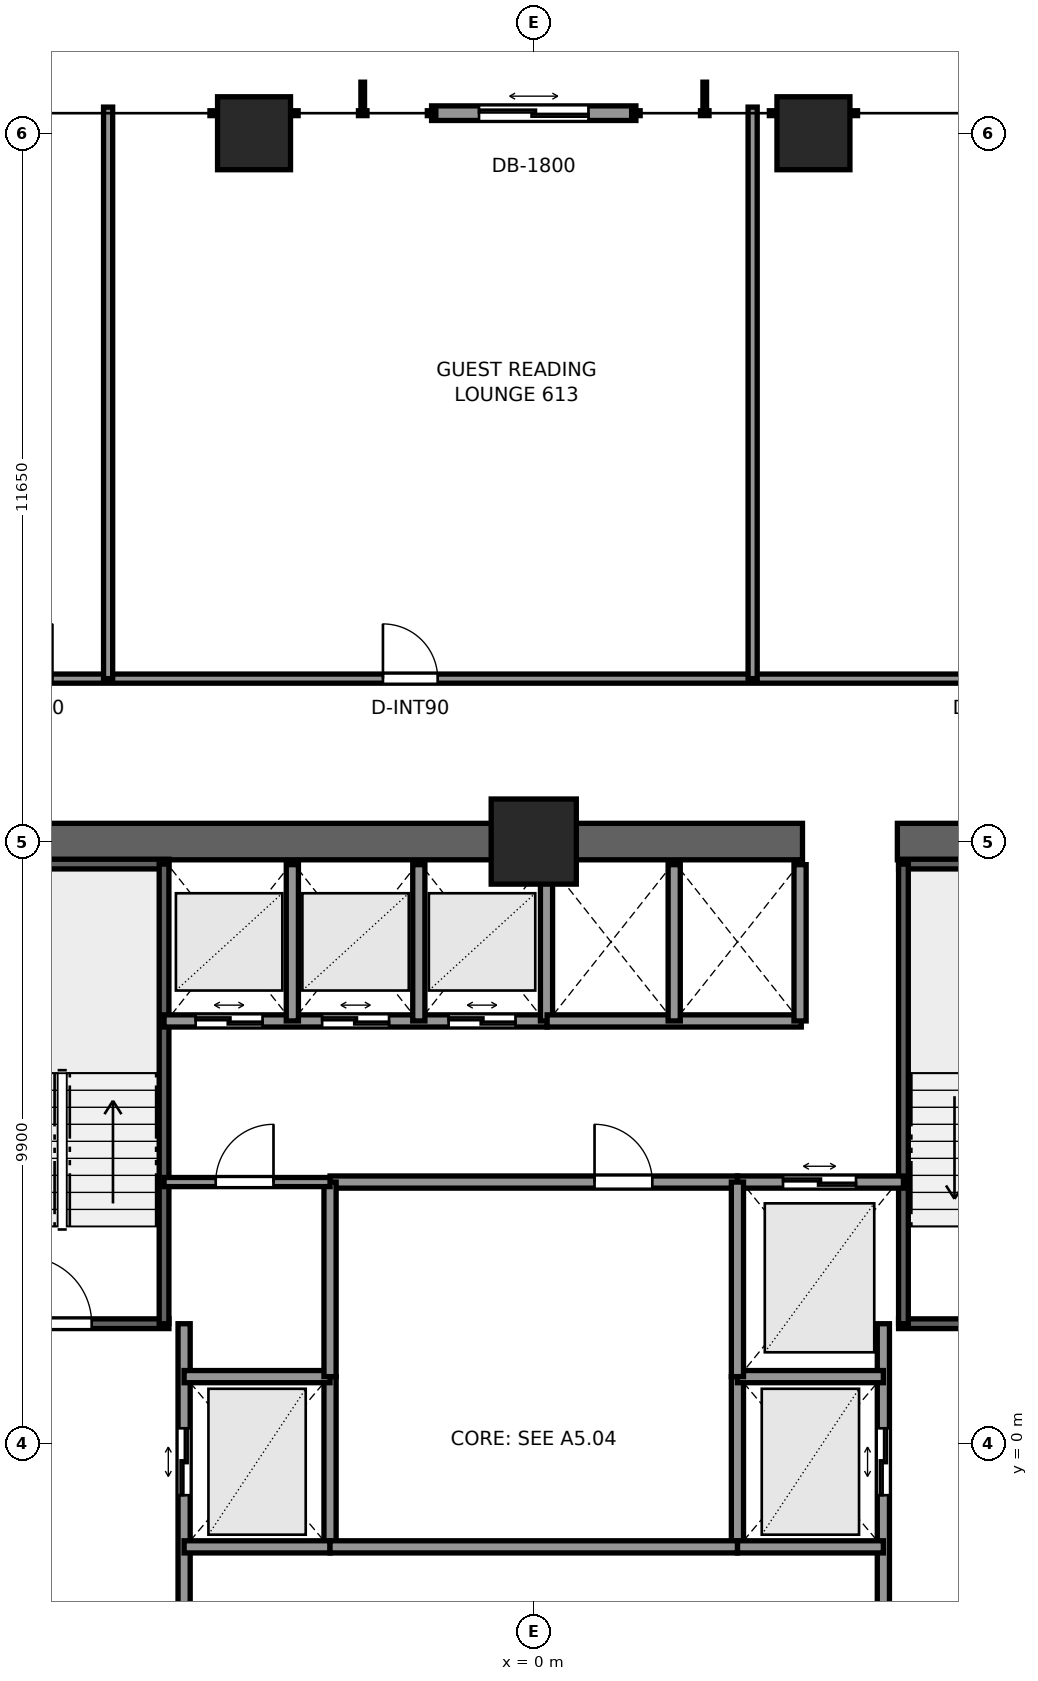
"""IFC4 building model, lengths in metres.
Left out: names, types, materials, properties, quantities, classifications, styles, units other than length and angle.
Written with IfcOpenShell. Run it as: python <this file> out.ifc"""

import sys

from ifc_helpers import new_model, si_unit, direction, frame, frame_2d, origin, origin_2d, place, context, subcontext, project, spatial, rectangle, extrude, element, fill, save


model = new_model("IFC4")
c1 = context("Model", 3, precision=1e-05, world=origin(), true_north=direction((0.0, 1.0)))
c2 = subcontext(c1, "Body", "Model", "MODEL_VIEW")
j1 = project(units=[si_unit("LENGTHUNIT", "METRE"), si_unit("PLANEANGLEUNIT", "RADIAN")], contexts=[c1])
p1 = place(None, origin())
s1 = spatial("IfcSite", under=j1, at=p1, CompositionType="ELEMENT")
p2 = place(p1, origin())
s2 = spatial("IfcBuilding", under=s1, at=p2, CompositionType="ELEMENT")
p3 = place(p2, frame((0.0, 0.0, 23.8)))
s3 = spatial("IfcBuildingStorey", under=s2, at=p3, CompositionType="ELEMENT", Elevation=23.8)
p4 = place(p3, frame((-10.2, 9.9, 0.0), z_axis=(0.0, 0.0, 1.0), x_axis=(1.0, 0.0, 0.0)))
e1 = element("IfcWall", 1, at=p4, inside=s3, PredefinedType="SHEAR", context=c2, shape_type="SweptSolid", body=[
    extrude(rectangle(XDim=14.62, YDim=0.6, at=frame_2d((7.31, 0.0))), origin(), (0.0, 0.0, 1.0), 3.3),
])
p5 = place(p3, frame((5.98, 9.9, 0.0), z_axis=(0.0, 0.0, 1.0), x_axis=(1.0, 0.0, 0.0)))
e2 = element("IfcWall", 2, at=p5, inside=s3, PredefinedType="SHEAR", context=c2, shape_type="SweptSolid", body=[
    extrude(rectangle(XDim=4.22, YDim=0.6, at=frame_2d((2.11, 0.0))), origin(), (0.0, 0.0, 1.0), 3.3),
])
p6 = place(p3, frame((0.0, 9.9, 0.0), z_axis=(0.0, 0.0, 1.0), x_axis=(1.0, 0.0, 0.0)))
e3 = element("IfcColumn", 3, at=p6, inside=s3, PredefinedType="COLUMN", context=c2, shape_type="SweptSolid", body=[
    extrude(rectangle(XDim=1.4, YDim=1.4, at=origin_2d()), origin(), (0.0, 0.0, 1.0), 3.3),
])
for number, where, z_axis, x_axis in (
    (4, (-4.6, 21.55, 0.0), (0.0, 0.0, 1.0), (1.0, 0.0, 0.0)),
    (5, (4.6, 21.55, 0.0), (0.0, 0.0, 1.0), (1.0, 0.0, 0.0)),
):
    element("IfcColumn", number, at=place(p3, frame(where, z_axis=z_axis, x_axis=x_axis)), inside=s3, PredefinedType="COLUMN", context=c2, shape_type="SweptSolid", body=[
        extrude(rectangle(XDim=1.2, YDim=1.2, at=origin_2d()), origin(), (0.0, 0.0, 1.0), 3.3),
    ])
p7 = place(p3, frame((-1.68, 21.88, 0.0), z_axis=(0.0, 0.0, 1.0), x_axis=(1.0, 0.0, 0.0)))
e6 = element("IfcWall", 6, at=p7, inside=s3, PredefinedType="STANDARD", context=c2, shape_type="SweptSolid", body=[
    extrude(rectangle(XDim=3.36, YDim=0.24, at=frame_2d((1.68, 0.0))), origin(), (0.0, 0.0, 1.0), 3.06),
])
p8 = place(p7, frame((0.78, 0.0, 0.0)))
e7 = element("IfcOpeningElement", 7, at=p8, cuts=e6, PredefinedType="OPENING", context=c2, shape_type="SweptSolid", body=[
    extrude(rectangle(XDim=1.8, YDim=2.2, at=frame_2d((0.9, 1.1))), frame((0.0, 0.13, 0.0), z_axis=(0.0, -1.0, 0.0), x_axis=(1.0, 0.0, 0.0)), (0.0, 0.0, 1.0), 0.26),
])
p9 = place(p3, frame((-9.52, 1.97, 0.0), z_axis=(0.0, 0.0, 1.0), x_axis=(1.0, 0.0, 0.0)))
e8 = element("IfcWall", 8, at=p9, inside=s3, PredefinedType="SHEAR", context=c2, shape_type="SweptSolid", body=[
    extrude(rectangle(XDim=3.52, YDim=0.16, at=frame_2d((1.76, 0.0))), origin(), (0.0, 0.0, 1.0), 3.3),
])
p10 = place(p9, frame((1.15, 0.0, 0.0)))
e9 = element("IfcOpeningElement", 9, at=p10, cuts=e8, PredefinedType="OPENING", context=c2, shape_type="SweptSolid", body=[
    extrude(rectangle(XDim=1.1, YDim=2.2, at=frame_2d((0.55, 1.1))), frame((0.0, 0.09, 0.0), z_axis=(0.0, -1.0, 0.0), x_axis=(1.0, 0.0, 0.0)), (0.0, 0.0, 1.0), 0.18),
])
p11 = place(p3, frame((-9.52, 9.53, 0.0), z_axis=(0.0, 0.0, 1.0), x_axis=(1.0, 0.0, 0.0)))
e10 = element("IfcWall", 10, at=p11, inside=s3, PredefinedType="SHEAR", context=c2, shape_type="SweptSolid", body=[
    extrude(rectangle(XDim=3.52, YDim=0.16, at=frame_2d((1.76, 0.0))), origin(), (0.0, 0.0, 1.0), 3.3),
])
p12 = place(p3, frame((-6.08, 1.97, 0.0), z_axis=(0.0, 0.0, 1.0), x_axis=(0.0, 1.0, 0.0)))
e11 = element("IfcWall", 11, at=p12, inside=s3, PredefinedType="SHEAR", context=c2, shape_type="SweptSolid", body=[
    extrude(rectangle(XDim=7.56, YDim=0.16, at=frame_2d((3.78, 0.0))), origin(), (0.0, 0.0, 1.0), 3.3),
])
p13 = place(p3, frame((6.0, 1.97, 0.0), z_axis=(0.0, 0.0, 1.0), x_axis=(1.0, 0.0, 0.0)))
e12 = element("IfcWall", 12, at=p13, inside=s3, PredefinedType="SHEAR", context=c2, shape_type="SweptSolid", body=[
    extrude(rectangle(XDim=3.52, YDim=0.16, at=frame_2d((1.76, 0.0))), origin(), (0.0, 0.0, 1.0), 3.3),
])
p14 = place(p13, frame((1.15, 0.0, 0.0)))
e13 = element("IfcOpeningElement", 13, at=p14, cuts=e12, PredefinedType="OPENING", context=c2, shape_type="SweptSolid", body=[
    extrude(rectangle(XDim=1.1, YDim=2.2, at=frame_2d((0.55, 1.1))), frame((0.0, 0.09, 0.0), z_axis=(0.0, -1.0, 0.0), x_axis=(1.0, 0.0, 0.0)), (0.0, 0.0, 1.0), 0.18),
])
p15 = place(p3, frame((6.0, 9.53, 0.0), z_axis=(0.0, 0.0, 1.0), x_axis=(1.0, 0.0, 0.0)))
e14 = element("IfcWall", 14, at=p15, inside=s3, PredefinedType="SHEAR", context=c2, shape_type="SweptSolid", body=[
    extrude(rectangle(XDim=3.52, YDim=0.16, at=frame_2d((1.76, 0.0))), origin(), (0.0, 0.0, 1.0), 3.3),
])
p16 = place(p3, frame((6.08, 1.97, 0.0), z_axis=(0.0, 0.0, 1.0), x_axis=(0.0, 1.0, 0.0)))
e15 = element("IfcWall", 15, at=p16, inside=s3, PredefinedType="SHEAR", context=c2, shape_type="SweptSolid", body=[
    extrude(rectangle(XDim=7.56, YDim=0.16, at=frame_2d((3.78, 0.0))), origin(), (0.0, 0.0, 1.0), 3.3),
])
p17 = place(p3, frame((-5.75, -3.6, 0.0), z_axis=(0.0, 0.0, 1.0), x_axis=(0.0, 1.0, 0.0)))
e16 = element("IfcWall", 16, at=p17, inside=s3, PredefinedType="SOLIDWALL", context=c2, shape_type="SweptSolid", body=[
    extrude(rectangle(XDim=5.57, YDim=0.2, at=frame_2d((2.785, 0.0))), origin(), (0.0, 0.0, 1.0), 3.06),
])
p18 = place(p17, frame((2.75, 0.0, 0.0)))
e17 = element("IfcOpeningElement", 17, at=p18, cuts=e16, PredefinedType="OPENING", context=c2, shape_type="SweptSolid", body=[
    extrude(rectangle(XDim=1.1, YDim=2.2, at=frame_2d((0.55, 1.1))), frame((0.0, 0.11, 0.0), z_axis=(0.0, -1.0, 0.0), x_axis=(1.0, 0.0, 0.0)), (0.0, 0.0, 1.0), 0.22),
])
p19 = place(p3, frame((-3.35, -1.7, 0.0), z_axis=(0.0, 0.0, 1.0), x_axis=(0.0, 1.0, 0.0)))
e18 = element("IfcWall", 18, at=p19, inside=s3, PredefinedType="SOLIDWALL", context=c2, shape_type="SweptSolid", body=[
    extrude(rectangle(XDim=2.8, YDim=0.2, at=frame_2d((1.4, 0.0))), origin(), (0.0, 0.0, 1.0), 3.06),
])
for number, where, z_axis, x_axis in (
    (19, (-5.75, -1.7, 0.0), (0.0, 0.0, 1.0), (1.0, 0.0, 0.0)),
    (20, (-5.75, 1.1, 0.0), (0.0, 0.0, 1.0), (1.0, 0.0, 0.0)),
):
    element("IfcWall", number, at=place(p3, frame(where, z_axis=z_axis, x_axis=x_axis)), inside=s3, PredefinedType="SOLIDWALL", context=c2, shape_type="SweptSolid", body=[
        extrude(rectangle(XDim=2.4, YDim=0.2, at=frame_2d((1.2, 0.0))), origin(), (0.0, 0.0, 1.0), 3.06),
    ])
p20 = place(p3, frame((5.75, -3.6, 0.0), z_axis=(0.0, 0.0, 1.0), x_axis=(0.0, 1.0, 0.0)))
e21 = element("IfcWall", 21, at=p20, inside=s3, PredefinedType="SOLIDWALL", context=c2, shape_type="SweptSolid", body=[
    extrude(rectangle(XDim=5.57, YDim=0.2, at=frame_2d((2.785, 0.0))), origin(), (0.0, 0.0, 1.0), 3.06),
])
p21 = place(p20, frame((2.75, 0.0, 0.0)))
e22 = element("IfcOpeningElement", 22, at=p21, cuts=e21, PredefinedType="OPENING", context=c2, shape_type="SweptSolid", body=[
    extrude(rectangle(XDim=1.1, YDim=2.2, at=frame_2d((0.55, 1.1))), frame((0.0, 0.11, 0.0), z_axis=(0.0, -1.0, 0.0), x_axis=(1.0, 0.0, 0.0)), (0.0, 0.0, 1.0), 0.22),
])
p22 = place(p3, frame((3.35, -1.7, 0.0), z_axis=(0.0, 0.0, 1.0), x_axis=(0.0, 1.0, 0.0)))
e23 = element("IfcWall", 23, at=p22, inside=s3, PredefinedType="SOLIDWALL", context=c2, shape_type="SweptSolid", body=[
    extrude(rectangle(XDim=2.8, YDim=0.2, at=frame_2d((1.4, 0.0))), origin(), (0.0, 0.0, 1.0), 3.06),
])
for number, where, z_axis, x_axis in (
    (24, (3.35, -1.7, 0.0), (0.0, 0.0, 1.0), (1.0, 0.0, 0.0)),
    (25, (3.35, 1.1, 0.0), (0.0, 0.0, 1.0), (1.0, 0.0, 0.0)),
):
    element("IfcWall", number, at=place(p3, frame(where, z_axis=z_axis, x_axis=x_axis)), inside=s3, PredefinedType="SOLIDWALL", context=c2, shape_type="SweptSolid", body=[
        extrude(rectangle(XDim=2.4, YDim=0.2, at=frame_2d((1.2, 0.0))), origin(), (0.0, 0.0, 1.0), 3.06),
    ])
p23 = place(p3, frame((3.35, 4.3, 0.0), z_axis=(0.0, 0.0, 1.0), x_axis=(1.0, 0.0, 0.0)))
e26 = element("IfcWall", 26, at=p23, inside=s3, PredefinedType="SOLIDWALL", context=c2, shape_type="SweptSolid", body=[
    extrude(rectangle(XDim=2.73, YDim=0.2, at=frame_2d((1.365, 0.0))), origin(), (0.0, 0.0, 1.0), 3.06),
])
p24 = place(p23, frame((0.75, 0.0, 0.0)))
e27 = element("IfcOpeningElement", 27, at=p24, cuts=e26, PredefinedType="OPENING", context=c2, shape_type="SweptSolid", body=[
    extrude(rectangle(XDim=1.2, YDim=2.25, at=frame_2d((0.6, 1.125))), frame((0.0, 0.11, 0.0), z_axis=(0.0, -1.0, 0.0), x_axis=(1.0, 0.0, 0.0)), (0.0, 0.0, 1.0), 0.22),
])
p25 = place(p3, frame((-6.08, 6.95, 0.0), z_axis=(0.0, 0.0, 1.0), x_axis=(1.0, 0.0, 0.0)))
e28 = element("IfcWall", 28, at=p25, inside=s3, PredefinedType="SOLIDWALL", context=c2, shape_type="SweptSolid", body=[
    extrude(rectangle(XDim=6.3, YDim=0.2, at=frame_2d((3.15, 0.0))), origin(), (0.0, 0.0, 1.0), 3.06),
])
p26 = place(p25, frame((0.52, 0.0, 0.0)))
e29 = element("IfcOpeningElement", 29, at=p26, cuts=e28, PredefinedType="OPENING", context=c2, shape_type="SweptSolid", body=[
    extrude(rectangle(XDim=1.1, YDim=2.2, at=frame_2d((0.55, 1.1))), frame((0.0, 0.11, 0.0), z_axis=(0.0, -1.0, 0.0), x_axis=(1.0, 0.0, 0.0)), (0.0, 0.0, 1.0), 0.22),
])
p27 = place(p25, frame((2.6, 0.0, 0.0)))
e30 = element("IfcOpeningElement", 30, at=p27, cuts=e28, PredefinedType="OPENING", context=c2, shape_type="SweptSolid", body=[
    extrude(rectangle(XDim=1.1, YDim=2.2, at=frame_2d((0.55, 1.1))), frame((0.0, 0.11, 0.0), z_axis=(0.0, -1.0, 0.0), x_axis=(1.0, 0.0, 0.0)), (0.0, 0.0, 1.0), 0.22),
])
p28 = place(p25, frame((4.68, 0.0, 0.0)))
e31 = element("IfcOpeningElement", 31, at=p28, cuts=e28, PredefinedType="OPENING", context=c2, shape_type="SweptSolid", body=[
    extrude(rectangle(XDim=1.1, YDim=2.2, at=frame_2d((0.55, 1.1))), frame((0.0, 0.11, 0.0), z_axis=(0.0, -1.0, 0.0), x_axis=(1.0, 0.0, 0.0)), (0.0, 0.0, 1.0), 0.22),
])
for number, where, z_axis, x_axis in (
    (32, (-3.97, 6.95, 0.0), (0.0, 0.0, 1.0), (0.0, 1.0, 0.0)),
    (33, (-1.89, 6.95, 0.0), (0.0, 0.0, 1.0), (0.0, 1.0, 0.0)),
    (34, (0.21, 6.95, 0.0), (0.0, 0.0, 1.0), (0.0, 1.0, 0.0)),
):
    element("IfcWall", number, at=place(p3, frame(where, z_axis=z_axis, x_axis=x_axis)), inside=s3, PredefinedType="SOLIDWALL", context=c2, shape_type="SweptSolid", body=[
        extrude(rectangle(XDim=2.57, YDim=0.2, at=frame_2d((1.285, 0.0))), origin(), (0.0, 0.0, 1.0), 3.06),
    ])
p29 = place(p3, frame((0.22, 6.95, 0.0), z_axis=(0.0, 0.0, 1.0), x_axis=(1.0, 0.0, 0.0)))
e35 = element("IfcWall", 35, at=p29, inside=s3, PredefinedType="SOLIDWALL", context=c2, shape_type="SweptSolid", body=[
    extrude(rectangle(XDim=4.18, YDim=0.2, at=frame_2d((2.09, 0.0))), origin(), (0.0, 0.0, 1.0), 3.06),
])
for number, where, z_axis, x_axis in (
    (36, (4.38, 6.95, 0.0), (0.0, 0.0, 1.0), (0.0, 1.0, 0.0)),
    (37, (2.31, 6.95, 0.0), (0.0, 0.0, 1.0), (0.0, 1.0, 0.0)),
):
    element("IfcWall", number, at=place(p3, frame(where, z_axis=z_axis, x_axis=x_axis)), inside=s3, PredefinedType="SOLIDWALL", context=c2, shape_type="SweptSolid", body=[
        extrude(rectangle(XDim=2.57, YDim=0.2, at=frame_2d((1.285, 0.0))), origin(), (0.0, 0.0, 1.0), 3.06),
    ])
p30 = place(p3, frame((-3.35, 4.3, 0.0), z_axis=(0.0, 0.0, 1.0), x_axis=(1.0, 0.0, 0.0)))
e38 = element("IfcWall", 38, at=p30, inside=s3, PredefinedType="SOLIDWALL", context=c2, shape_type="SweptSolid", body=[
    extrude(rectangle(XDim=6.7, YDim=0.2, at=frame_2d((3.35, 0.0))), origin(), (0.0, 0.0, 1.0), 3.06),
])
p31 = place(p30, frame((4.35, 0.0, 0.0)))
e39 = element("IfcOpeningElement", 39, at=p31, cuts=e38, PredefinedType="OPENING", context=c2, shape_type="SweptSolid", body=[
    extrude(rectangle(XDim=0.95, YDim=2.06, at=frame_2d((0.475, 1.03))), frame((0.0, 0.11, 0.0), z_axis=(0.0, -1.0, 0.0), x_axis=(1.0, 0.0, 0.0)), (0.0, 0.0, 1.0), 0.22),
])
p32 = place(p3, frame((-3.35, -1.7, 0.0), z_axis=(0.0, 0.0, 1.0), x_axis=(1.0, 0.0, 0.0)))
e40 = element("IfcWall", 40, at=p32, inside=s3, PredefinedType="SOLIDWALL", context=c2, shape_type="SweptSolid", body=[
    extrude(rectangle(XDim=6.7, YDim=0.2, at=frame_2d((3.35, 0.0))), origin(), (0.0, 0.0, 1.0), 3.06),
])
for number, where, z_axis, x_axis in (
    (41, (-3.35, 1.1, 0.0), (0.0, 0.0, 1.0), (0.0, 1.0, 0.0)),
    (42, (3.35, 1.1, 0.0), (0.0, 0.0, 1.0), (0.0, 1.0, 0.0)),
):
    element("IfcWall", number, at=place(p3, frame(where, z_axis=z_axis, x_axis=x_axis)), inside=s3, PredefinedType="SOLIDWALL", context=c2, shape_type="SweptSolid", body=[
        extrude(rectangle(XDim=3.2, YDim=0.2, at=frame_2d((1.6, 0.0))), origin(), (0.0, 0.0, 1.0), 3.06),
    ])
p33 = place(p3, frame((-6.08, 4.3, 0.0), z_axis=(0.0, 0.0, 1.0), x_axis=(1.0, 0.0, 0.0)))
e43 = element("IfcWall", 43, at=p33, inside=s3, PredefinedType="PARTITIONING", context=c2, shape_type="SweptSolid", body=[
    extrude(rectangle(XDim=2.73, YDim=0.15, at=frame_2d((1.365, 0.0))), origin(), (0.0, 0.0, 1.0), 3.06),
])
p34 = place(p33, frame((0.85, 0.0, 0.0)))
e44 = element("IfcOpeningElement", 44, at=p34, cuts=e43, PredefinedType="OPENING", context=c2, shape_type="SweptSolid", body=[
    extrude(rectangle(XDim=0.95, YDim=2.06, at=frame_2d((0.475, 1.03))), frame((0.0, 0.085, 0.0), z_axis=(0.0, -1.0, 0.0), x_axis=(1.0, 0.0, 0.0)), (0.0, 0.0, 1.0), 0.17),
])
p35 = place(p3, frame((-12.26, 12.58, 0.0), z_axis=(0.0, 0.0, 1.0), x_axis=(1.0, 0.0, 0.0)))
e45 = element("IfcWall", 45, at=p35, inside=s3, PredefinedType="PARTITIONING", context=c2, shape_type="SweptSolid", body=[
    extrude(rectangle(XDim=24.68, YDim=0.15, at=frame_2d((12.34, 0.0))), origin(), (0.0, 0.0, 1.0), 2.272),
])
p36 = place(p35, frame((3.444, 0.0, 0.0)))
e46 = element("IfcOpeningElement", 46, at=p36, cuts=e45, PredefinedType="OPENING", context=c2, shape_type="SweptSolid", body=[
    extrude(rectangle(XDim=0.9, YDim=2.06, at=frame_2d((0.45, 1.03))), frame((0.0, 0.085, 0.0), z_axis=(0.0, -1.0, 0.0), x_axis=(1.0, 0.0, 0.0)), (0.0, 0.0, 1.0), 0.17),
])
p37 = place(p35, frame((9.78, 0.0, 0.0)))
e47 = element("IfcOpeningElement", 47, at=p37, cuts=e45, PredefinedType="OPENING", context=c2, shape_type="SweptSolid", body=[
    extrude(rectangle(XDim=0.9, YDim=2.06, at=frame_2d((0.45, 1.03))), frame((0.0, 0.085, 0.0), z_axis=(0.0, -1.0, 0.0), x_axis=(1.0, 0.0, 0.0)), (0.0, 0.0, 1.0), 0.17),
])
p38 = place(p35, frame((19.345, 0.0, 0.0)))
e48 = element("IfcOpeningElement", 48, at=p38, cuts=e45, PredefinedType="OPENING", context=c2, shape_type="SweptSolid", body=[
    extrude(rectangle(XDim=0.9, YDim=2.06, at=frame_2d((0.45, 1.03))), frame((0.0, 0.085, 0.0), z_axis=(0.0, -1.0, 0.0), x_axis=(1.0, 0.0, 0.0)), (0.0, 0.0, 1.0), 0.17),
])
for number, where, z_axis, x_axis in (
    (49, (-7.0, 12.58, 0.0), (0.0, 0.0, 1.0), (0.0, 1.0, 0.0)),
    (50, (3.6, 12.58, 0.0), (0.0, 0.0, 1.0), (0.0, 1.0, 0.0)),
):
    element("IfcWall", number, at=place(p3, frame(where, z_axis=z_axis, x_axis=x_axis)), inside=s3, PredefinedType="PARTITIONING", context=c2, shape_type="SweptSolid", body=[
        extrude(rectangle(XDim=9.4, YDim=0.15, at=frame_2d((4.7, 0.0))), origin(), (0.0, 0.0, 1.0), 2.429),
    ])
p39 = place(p8, origin())
e51 = element("IfcDoor", 51, at=p39, inside=s3, OperationType="DOUBLE_DOOR_SLIDING", PredefinedType="DOOR", context=c2, shape_type="SweptSolid", body=[
    extrude(rectangle(XDim=1.8, YDim=2.2, at=frame_2d((0.9, 1.1))), frame((0.0, 0.025, 0.0), z_axis=(0.0, -1.0, 0.0), x_axis=(1.0, 0.0, 0.0)), (0.0, 0.0, 1.0), 0.05),
])
fill(e7, e51)
p40 = place(p10, origin())
e52 = element("IfcDoor", 52, at=p40, inside=s3, OperationType="SINGLE_SWING_LEFT", PredefinedType="DOOR", context=c2, shape_type="SweptSolid", body=[
    extrude(rectangle(XDim=1.1, YDim=2.2, at=frame_2d((0.55, 1.1))), frame((0.0, 0.025, 0.0), z_axis=(0.0, -1.0, 0.0), x_axis=(1.0, 0.0, 0.0)), (0.0, 0.0, 1.0), 0.05),
])
fill(e9, e52)
p41 = place(p18, origin())
e53 = element("IfcDoor", 53, at=p41, inside=s3, OperationType="DOUBLE_DOOR_SLIDING", PredefinedType="DOOR", context=c2, shape_type="SweptSolid", body=[
    extrude(rectangle(XDim=1.1, YDim=2.2, at=frame_2d((0.55, 1.1))), frame((0.0, 0.025, 0.0), z_axis=(0.0, -1.0, 0.0), x_axis=(1.0, 0.0, 0.0)), (0.0, 0.0, 1.0), 0.05),
])
fill(e17, e53)
p42 = place(p21, origin())
e54 = element("IfcDoor", 54, at=p42, inside=s3, OperationType="DOUBLE_DOOR_SLIDING", PredefinedType="DOOR", context=c2, shape_type="SweptSolid", body=[
    extrude(rectangle(XDim=1.1, YDim=2.2, at=frame_2d((0.55, 1.1))), frame((0.0, 0.025, 0.0), z_axis=(0.0, -1.0, 0.0), x_axis=(1.0, 0.0, 0.0)), (0.0, 0.0, 1.0), 0.05),
])
fill(e22, e54)
p43 = place(p24, origin())
e55 = element("IfcDoor", 55, at=p43, inside=s3, OperationType="DOUBLE_DOOR_SLIDING", PredefinedType="DOOR", context=c2, shape_type="SweptSolid", body=[
    extrude(rectangle(XDim=1.2, YDim=2.25, at=frame_2d((0.6, 1.125))), frame((0.0, 0.025, 0.0), z_axis=(0.0, -1.0, 0.0), x_axis=(1.0, 0.0, 0.0)), (0.0, 0.0, 1.0), 0.05),
])
fill(e27, e55)
p44 = place(p26, origin())
e56 = element("IfcDoor", 56, at=p44, inside=s3, OperationType="DOUBLE_DOOR_SLIDING", PredefinedType="DOOR", context=c2, shape_type="SweptSolid", body=[
    extrude(rectangle(XDim=1.1, YDim=2.2, at=frame_2d((0.55, 1.1))), frame((0.0, 0.025, 0.0), z_axis=(0.0, -1.0, 0.0), x_axis=(1.0, 0.0, 0.0)), (0.0, 0.0, 1.0), 0.05),
])
fill(e29, e56)
p45 = place(p27, origin())
e57 = element("IfcDoor", 57, at=p45, inside=s3, OperationType="DOUBLE_DOOR_SLIDING", PredefinedType="DOOR", context=c2, shape_type="SweptSolid", body=[
    extrude(rectangle(XDim=1.1, YDim=2.2, at=frame_2d((0.55, 1.1))), frame((0.0, 0.025, 0.0), z_axis=(0.0, -1.0, 0.0), x_axis=(1.0, 0.0, 0.0)), (0.0, 0.0, 1.0), 0.05),
])
fill(e30, e57)
p46 = place(p28, origin())
e58 = element("IfcDoor", 58, at=p46, inside=s3, OperationType="DOUBLE_DOOR_SLIDING", PredefinedType="DOOR", context=c2, shape_type="SweptSolid", body=[
    extrude(rectangle(XDim=1.1, YDim=2.2, at=frame_2d((0.55, 1.1))), frame((0.0, 0.025, 0.0), z_axis=(0.0, -1.0, 0.0), x_axis=(1.0, 0.0, 0.0)), (0.0, 0.0, 1.0), 0.05),
])
fill(e31, e58)
p47 = place(p31, origin())
e59 = element("IfcDoor", 59, at=p47, inside=s3, OperationType="SINGLE_SWING_LEFT", PredefinedType="DOOR", context=c2, shape_type="SweptSolid", body=[
    extrude(rectangle(XDim=0.95, YDim=2.06, at=frame_2d((0.475, 1.03))), frame((0.0, 0.025, 0.0), z_axis=(0.0, -1.0, 0.0), x_axis=(1.0, 0.0, 0.0)), (0.0, 0.0, 1.0), 0.05),
])
fill(e39, e59)
p48 = place(p34, origin())
e60 = element("IfcDoor", 60, at=p48, inside=s3, OperationType="SINGLE_SWING_RIGHT", PredefinedType="DOOR", context=c2, shape_type="SweptSolid", body=[
    extrude(rectangle(XDim=0.95, YDim=2.06, at=frame_2d((0.475, 1.03))), frame((0.0, 0.025, 0.0), z_axis=(0.0, -1.0, 0.0), x_axis=(1.0, 0.0, 0.0)), (0.0, 0.0, 1.0), 0.05),
])
fill(e44, e60)
p49 = place(p36, origin())
e61 = element("IfcDoor", 61, at=p49, inside=s3, OperationType="SINGLE_SWING_RIGHT", PredefinedType="DOOR", context=c2, shape_type="SweptSolid", body=[
    extrude(rectangle(XDim=0.9, YDim=2.06, at=frame_2d((0.45, 1.03))), frame((0.0, 0.025, 0.0), z_axis=(0.0, -1.0, 0.0), x_axis=(1.0, 0.0, 0.0)), (0.0, 0.0, 1.0), 0.05),
])
fill(e46, e61)
p50 = place(p37, origin())
e62 = element("IfcDoor", 62, at=p50, inside=s3, OperationType="SINGLE_SWING_LEFT", PredefinedType="DOOR", context=c2, shape_type="SweptSolid", body=[
    extrude(rectangle(XDim=0.9, YDim=2.06, at=frame_2d((0.45, 1.03))), frame((0.0, 0.025, 0.0), z_axis=(0.0, -1.0, 0.0), x_axis=(1.0, 0.0, 0.0)), (0.0, 0.0, 1.0), 0.05),
])
fill(e47, e62)
save(model, sys.argv[1])
